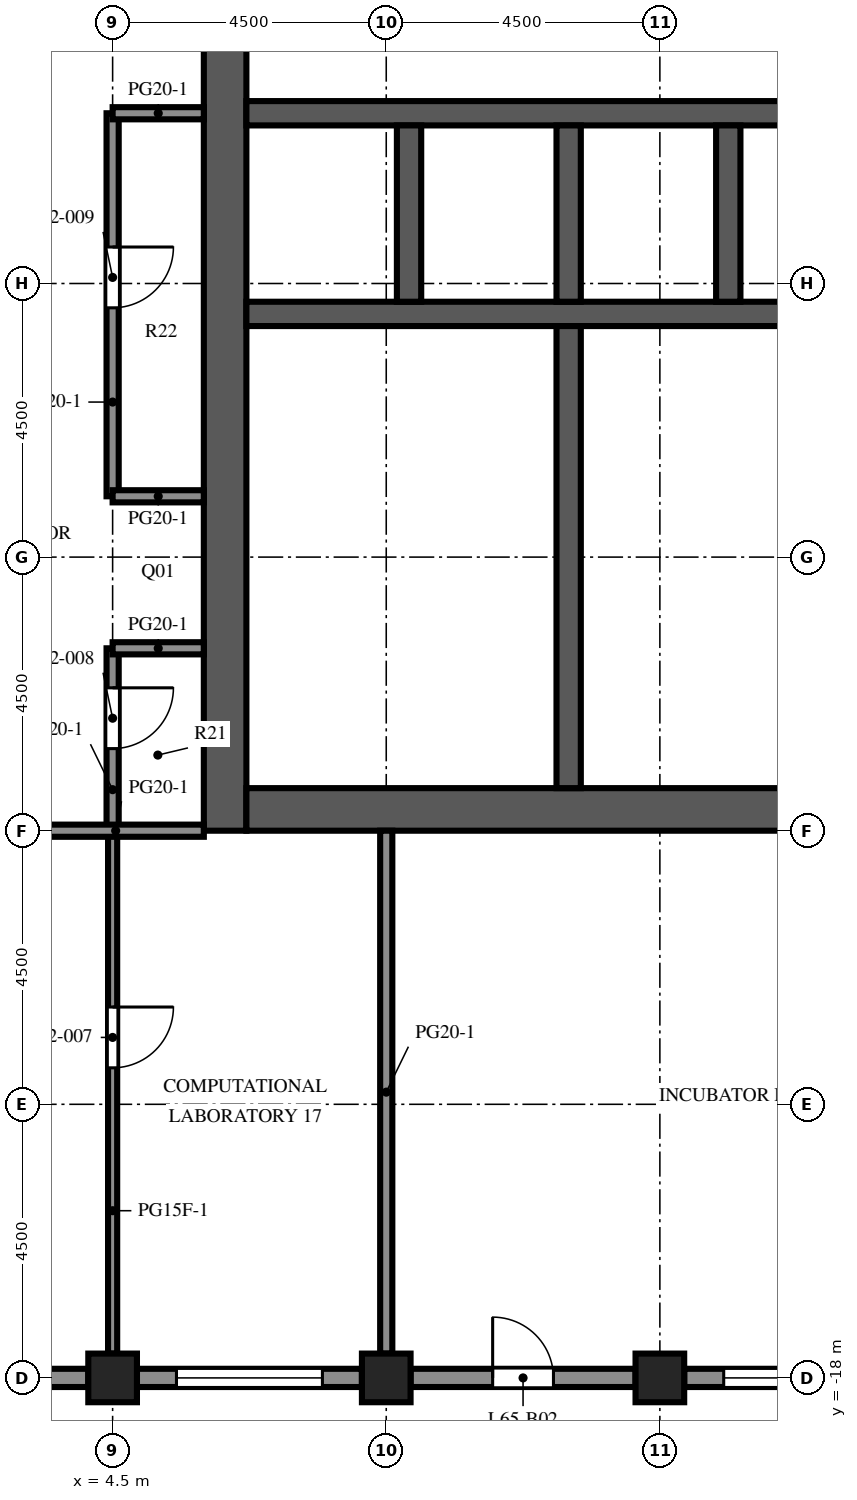
"""IFC4 building model, lengths in metres.
Left out: names, types, materials, properties, quantities, classifications, styles, units other than length and angle.
Written with IfcOpenShell. Run it as: python <this file> out.ifc"""

import sys

from ifc_helpers import new_model, si_unit, direction, frame, frame_2d, origin, origin_2d, place, context, subcontext, project, spatial, rectangle, extrude, element, fill, save


model = new_model("IFC4")
c1 = context("Model", 3, precision=1e-05, world=origin(), true_north=direction((0.0, 1.0)))
c2 = subcontext(c1, "Body", "Model", "MODEL_VIEW")
j1 = project(units=[si_unit("LENGTHUNIT", "METRE"), si_unit("PLANEANGLEUNIT", "RADIAN")], contexts=[c1])
p1 = place(None, origin())
s1 = spatial("IfcSite", under=j1, at=p1, CompositionType="ELEMENT")
p2 = place(p1, origin())
s2 = spatial("IfcBuilding", under=s1, at=p2, CompositionType="ELEMENT")
p3 = place(p2, frame((0.0, 0.0, 286.8)))
s3 = spatial("IfcBuildingStorey", under=s2, at=p3, CompositionType="ELEMENT", Elevation=286.8)
for number, where, z_axis, x_axis in (
    (1, (4.5, -18.0, 0.0), (0.0, 0.0, 1.0), (1.0, 0.0, 0.0)),
    (2, (9.0, -18.0, 0.0), (0.0, 0.0, 1.0), (1.0, 0.0, 0.0)),
    (3, (13.5, -18.0, 0.0), (0.0, 0.0, 1.0), (1.0, 0.0, 0.0)),
):
    element("IfcColumn", number, at=place(p3, frame(where, z_axis=z_axis, x_axis=x_axis)), inside=s3, PredefinedType="COLUMN", context=c2, shape_type="SweptSolid", body=[
        extrude(rectangle(XDim=0.8, YDim=0.8, at=origin_2d()), origin(), (0.0, 0.0, 1.0), 4.1),
    ])
p4 = place(p3, frame((6.35, -9.0, 0.0), z_axis=(0.0, 0.0, 1.0), x_axis=(0.0, 1.0, 0.0)))
e4 = element("IfcWall", 4, at=p4, inside=s3, PredefinedType="SHEAR", context=c2, shape_type="SweptSolid", body=[
    extrude(rectangle(XDim=27.5, YDim=0.7, at=frame_2d((13.75, 0.0))), origin(), (0.0, 0.0, 1.0), 4.1),
])
p5 = place(p4, frame((12.55, 0.0, 0.0)))
e5 = element("IfcOpeningElement", 5, at=p5, cuts=e4, PredefinedType="OPENING", context=c2, shape_type="SweptSolid", body=[
    extrude(rectangle(XDim=2.4, YDim=2.4, at=frame_2d((1.2, 1.2))), frame((0.0, 0.36, 0.0), z_axis=(0.0, -1.0, 0.0), x_axis=(1.0, 0.0, 0.0)), (0.0, 0.0, 1.0), 0.72),
])
p6 = place(p4, frame((3.9, 0.0, 0.0)))
e6 = element("IfcOpeningElement", 6, at=p6, cuts=e4, PredefinedType="OPENING", context=c2, shape_type="SweptSolid", body=[
    extrude(rectangle(XDim=1.2, YDim=2.1, at=frame_2d((0.6, 1.05))), frame((0.0, 0.36, 0.0), z_axis=(0.0, -1.0, 0.0), x_axis=(1.0, 0.0, 0.0)), (0.0, 0.0, 1.0), 0.72),
])
p7 = place(p4, frame((22.4, 0.0, 0.0)))
e7 = element("IfcOpeningElement", 7, at=p7, cuts=e4, PredefinedType="OPENING", context=c2, shape_type="SweptSolid", body=[
    extrude(rectangle(XDim=1.2, YDim=2.1, at=frame_2d((0.6, 1.05))), frame((0.0, 0.36, 0.0), z_axis=(0.0, -1.0, 0.0), x_axis=(1.0, 0.0, 0.0)), (0.0, 0.0, 1.0), 0.72),
])
p8 = place(p3, frame((6.7, -8.65, 0.0), z_axis=(0.0, 0.0, 1.0), x_axis=(1.0, 0.0, 0.0)))
e8 = element("IfcWall", 8, at=p8, inside=s3, PredefinedType="SHEAR", context=c2, shape_type="SweptSolid", body=[
    extrude(rectangle(XDim=10.6, YDim=0.7, at=frame_2d((5.3, 0.0))), origin(), (0.0, 0.0, 1.0), 4.1),
])
p9 = place(p3, frame((6.7, -0.5, 0.0), z_axis=(0.0, 0.0, 1.0), x_axis=(1.0, 0.0, 0.0)))
e9 = element("IfcWall", 9, at=p9, inside=s3, PredefinedType="SHEAR", context=c2, shape_type="SweptSolid", body=[
    extrude(rectangle(XDim=10.6, YDim=0.4, at=frame_2d((5.3, 0.0))), origin(), (0.0, 0.0, 1.0), 4.1),
])
p10 = place(p3, frame((6.7, 2.8, 0.0), z_axis=(0.0, 0.0, 1.0), x_axis=(1.0, 0.0, 0.0)))
e10 = element("IfcWall", 10, at=p10, inside=s3, PredefinedType="SHEAR", context=c2, shape_type="SweptSolid", body=[
    extrude(rectangle(XDim=10.6, YDim=0.4, at=frame_2d((5.3, 0.0))), origin(), (0.0, 0.0, 1.0), 4.1),
])
p11 = place(p10, frame((0.688, 0.0, 0.0)))
e11 = element("IfcOpeningElement", 11, at=p11, cuts=e10, PredefinedType="OPENING", context=c2, shape_type="SweptSolid", body=[
    extrude(rectangle(XDim=1.1, YDim=2.1, at=frame_2d((0.55, 1.05))), frame((0.0, 0.21, 0.0), z_axis=(0.0, -1.0, 0.0), x_axis=(1.0, 0.0, 0.0)), (0.0, 0.0, 1.0), 0.42),
])
p12 = place(p10, frame((3.438, 0.0, 0.0)))
e12 = element("IfcOpeningElement", 12, at=p12, cuts=e10, PredefinedType="OPENING", context=c2, shape_type="SweptSolid", body=[
    extrude(rectangle(XDim=1.1, YDim=2.1, at=frame_2d((0.55, 1.05))), frame((0.0, 0.21, 0.0), z_axis=(0.0, -1.0, 0.0), x_axis=(1.0, 0.0, 0.0)), (0.0, 0.0, 1.0), 0.42),
])
p13 = place(p10, frame((6.113, 0.0, 0.0)))
e13 = element("IfcOpeningElement", 13, at=p13, cuts=e10, PredefinedType="OPENING", context=c2, shape_type="SweptSolid", body=[
    extrude(rectangle(XDim=1.0, YDim=2.1, at=frame_2d((0.5, 1.05))), frame((0.0, 0.21, 0.0), z_axis=(0.0, -1.0, 0.0), x_axis=(1.0, 0.0, 0.0)), (0.0, 0.0, 1.0), 0.42),
])
p14 = place(p10, frame((8.863, 0.0, 0.0)))
e14 = element("IfcOpeningElement", 14, at=p14, cuts=e10, PredefinedType="OPENING", context=c2, shape_type="SweptSolid", body=[
    extrude(rectangle(XDim=1.0, YDim=2.1, at=frame_2d((0.5, 1.05))), frame((0.0, 0.21, 0.0), z_axis=(0.0, -1.0, 0.0), x_axis=(1.0, 0.0, 0.0)), (0.0, 0.0, 1.0), 0.42),
])
for number, where, z_axis, x_axis in (
    (15, (9.375, -0.3, 0.0), (0.0, 0.0, 1.0), (0.0, 1.0, 0.0)),
    (16, (12.0, -0.3, 0.0), (0.0, 0.0, 1.0), (0.0, 1.0, 0.0)),
    (17, (14.625, -0.3, 0.0), (0.0, 0.0, 1.0), (0.0, 1.0, 0.0)),
):
    element("IfcWall", number, at=place(p3, frame(where, z_axis=z_axis, x_axis=x_axis)), inside=s3, PredefinedType="SHEAR", context=c2, shape_type="SweptSolid", body=[
        extrude(rectangle(XDim=2.9, YDim=0.4, at=frame_2d((1.45, 0.0))), origin(), (0.0, 0.0, 1.0), 4.1),
    ])
p15 = place(p3, frame((12.0, -8.3, 0.0), z_axis=(0.0, 0.0, 1.0), x_axis=(0.0, 1.0, 0.0)))
e18 = element("IfcWall", 18, at=p15, inside=s3, PredefinedType="SHEAR", context=c2, shape_type="SweptSolid", body=[
    extrude(rectangle(XDim=7.6, YDim=0.4, at=frame_2d((3.8, 0.0))), origin(), (0.0, 0.0, 1.0), 4.1),
])
p16 = place(p3, frame((4.1, -18.0, 0.0), z_axis=(0.0, 0.0, 1.0), x_axis=(-1.0, 0.0, 0.0)))
e19 = element("IfcWall", 19, at=p16, inside=s3, PredefinedType="SOLIDWALL", context=c2, shape_type="SweptSolid", body=[
    extrude(rectangle(XDim=3.7, YDim=0.3, at=frame_2d((1.85, 0.0))), origin(), (0.0, 0.0, 1.0), 2.85),
])
p17 = place(p16, frame((0.65, 0.0, 0.8)))
e20 = element("IfcOpeningElement", 20, at=p17, cuts=e19, PredefinedType="OPENING", context=c2, shape_type="SweptSolid", body=[
    extrude(rectangle(XDim=2.4, YDim=1.7, at=frame_2d((1.2, 0.85))), frame((0.0, 0.16, 0.0), z_axis=(0.0, -1.0, 0.0), x_axis=(1.0, 0.0, 0.0)), (0.0, 0.0, 1.0), 0.32),
])
p18 = place(p3, frame((8.6, -18.0, 0.0), z_axis=(0.0, 0.0, 1.0), x_axis=(-1.0, 0.0, 0.0)))
e21 = element("IfcWall", 21, at=p18, inside=s3, PredefinedType="SOLIDWALL", context=c2, shape_type="SweptSolid", body=[
    extrude(rectangle(XDim=3.7, YDim=0.3, at=frame_2d((1.85, 0.0))), origin(), (0.0, 0.0, 1.0), 2.85),
])
p19 = place(p18, frame((0.65, 0.0, 0.8)))
e22 = element("IfcOpeningElement", 22, at=p19, cuts=e21, PredefinedType="OPENING", context=c2, shape_type="SweptSolid", body=[
    extrude(rectangle(XDim=2.4, YDim=1.7, at=frame_2d((1.2, 0.85))), frame((0.0, 0.16, 0.0), z_axis=(0.0, -1.0, 0.0), x_axis=(1.0, 0.0, 0.0)), (0.0, 0.0, 1.0), 0.32),
])
p20 = place(p3, frame((13.1, -18.0, 0.0), z_axis=(0.0, 0.0, 1.0), x_axis=(-1.0, 0.0, 0.0)))
e23 = element("IfcWall", 23, at=p20, inside=s3, PredefinedType="SOLIDWALL", context=c2, shape_type="SweptSolid", body=[
    extrude(rectangle(XDim=3.7, YDim=0.3, at=frame_2d((1.85, 0.0))), origin(), (0.0, 0.0, 1.0), 2.85),
])
p21 = place(p20, frame((1.35, 0.0, 0.0)))
e24 = element("IfcOpeningElement", 24, at=p21, cuts=e23, PredefinedType="OPENING", context=c2, shape_type="SweptSolid", body=[
    extrude(rectangle(XDim=1.0, YDim=2.2, at=frame_2d((0.5, 1.1))), frame((0.0, 0.16, 0.0), z_axis=(0.0, -1.0, 0.0), x_axis=(1.0, 0.0, 0.0)), (0.0, 0.0, 1.0), 0.32),
])
p22 = place(p3, frame((17.6, -18.0, 0.0), z_axis=(0.0, 0.0, 1.0), x_axis=(-1.0, 0.0, 0.0)))
e25 = element("IfcWall", 25, at=p22, inside=s3, PredefinedType="SOLIDWALL", context=c2, shape_type="SweptSolid", body=[
    extrude(rectangle(XDim=3.7, YDim=0.3, at=frame_2d((1.85, 0.0))), origin(), (0.0, 0.0, 1.0), 2.85),
])
p23 = place(p22, frame((0.65, 0.0, 0.8)))
e26 = element("IfcOpeningElement", 26, at=p23, cuts=e25, PredefinedType="OPENING", context=c2, shape_type="SweptSolid", body=[
    extrude(rectangle(XDim=2.4, YDim=1.7, at=frame_2d((1.2, 0.85))), frame((0.0, 0.16, 0.0), z_axis=(0.0, -1.0, 0.0), x_axis=(1.0, 0.0, 0.0)), (0.0, 0.0, 1.0), 0.32),
])
p24 = place(p3, frame((8.2, -8.3, 0.0), z_axis=(0.0, 0.0, 1.0), x_axis=(0.0, 1.0, 0.0)))
e27 = element("IfcWall", 27, at=p24, inside=s3, PredefinedType="PARTITIONING", context=c2, shape_type="SweptSolid", body=[
    extrude(rectangle(XDim=2.28, YDim=0.1, at=frame_2d((1.14, 0.0))), origin(), (0.0, 0.0, 1.0), 3.65),
])
p25 = place(p24, frame((0.64, 0.0, 0.0)))
e28 = element("IfcOpeningElement", 28, at=p25, cuts=e27, PredefinedType="OPENING", context=c2, shape_type="SweptSolid", body=[
    extrude(rectangle(XDim=1.0, YDim=2.1, at=frame_2d((0.5, 1.05))), frame((0.0, 0.06, 0.0), z_axis=(0.0, -1.0, 0.0), x_axis=(1.0, 0.0, 0.0)), (0.0, 0.0, 1.0), 0.12),
])
p26 = place(p3, frame((8.2, -6.02, 0.0), z_axis=(0.0, 0.0, 1.0), x_axis=(0.0, 1.0, 0.0)))
e29 = element("IfcWall", 29, at=p26, inside=s3, PredefinedType="PARTITIONING", context=c2, shape_type="SweptSolid", body=[
    extrude(rectangle(XDim=2.28, YDim=0.1, at=frame_2d((1.14, 0.0))), origin(), (0.0, 0.0, 1.0), 3.65),
])
p27 = place(p26, frame((0.64, 0.0, 0.0)))
e30 = element("IfcOpeningElement", 30, at=p27, cuts=e29, PredefinedType="OPENING", context=c2, shape_type="SweptSolid", body=[
    extrude(rectangle(XDim=1.0, YDim=2.1, at=frame_2d((0.5, 1.05))), frame((0.0, 0.06, 0.0), z_axis=(0.0, -1.0, 0.0), x_axis=(1.0, 0.0, 0.0)), (0.0, 0.0, 1.0), 0.12),
])
p28 = place(p3, frame((8.2, -3.74, 0.0), z_axis=(0.0, 0.0, 1.0), x_axis=(0.0, 1.0, 0.0)))
e31 = element("IfcWall", 31, at=p28, inside=s3, PredefinedType="PARTITIONING", context=c2, shape_type="SweptSolid", body=[
    extrude(rectangle(XDim=1.672, YDim=0.1, at=frame_2d((0.836, 0.0))), origin(), (0.0, 0.0, 1.0), 3.65),
])
p29 = place(p28, frame((0.336, 0.0, 0.0)))
e32 = element("IfcOpeningElement", 32, at=p29, cuts=e31, PredefinedType="OPENING", context=c2, shape_type="SweptSolid", body=[
    extrude(rectangle(XDim=1.0, YDim=2.1, at=frame_2d((0.5, 1.05))), frame((0.0, 0.06, 0.0), z_axis=(0.0, -1.0, 0.0), x_axis=(1.0, 0.0, 0.0)), (0.0, 0.0, 1.0), 0.12),
])
p30 = place(p3, frame((8.2, -2.068, 0.0), z_axis=(0.0, 0.0, 1.0), x_axis=(0.0, 1.0, 0.0)))
e33 = element("IfcWall", 33, at=p30, inside=s3, PredefinedType="PARTITIONING", context=c2, shape_type="SweptSolid", body=[
    extrude(rectangle(XDim=1.368, YDim=0.1, at=frame_2d((0.684, 0.0))), origin(), (0.0, 0.0, 1.0), 3.65),
])
p31 = place(p30, frame((0.2, 0.0, 0.0)))
e34 = element("IfcOpeningElement", 34, at=p31, cuts=e33, PredefinedType="OPENING", context=c2, shape_type="SweptSolid", body=[
    extrude(rectangle(XDim=0.968, YDim=2.1, at=frame_2d((0.484, 1.05))), frame((0.0, 0.06, 0.0), z_axis=(0.0, -1.0, 0.0), x_axis=(1.0, 0.0, 0.0)), (0.0, 0.0, 1.0), 0.12),
])
for number, where, z_axis, x_axis in (
    (35, (8.2, -6.02, 0.0), (0.0, 0.0, 1.0), (1.0, 0.0, 0.0)),
    (36, (8.2, -3.74, 0.0), (0.0, 0.0, 1.0), (1.0, 0.0, 0.0)),
    (37, (8.2, -2.068, 0.0), (0.0, 0.0, 1.0), (1.0, 0.0, 0.0)),
):
    element("IfcWall", number, at=place(p3, frame(where, z_axis=z_axis, x_axis=x_axis)), inside=s3, PredefinedType="PARTITIONING", context=c2, shape_type="SweptSolid", body=[
        extrude(rectangle(XDim=3.6, YDim=0.1, at=frame_2d((1.8, 0.0))), origin(), (0.0, 0.0, 1.0), 3.65),
    ])
p32 = place(p3, frame((4.5, -9.0, 0.0), z_axis=(0.0, 0.0, 1.0), x_axis=(0.0, -1.0, 0.0)))
e38 = element("IfcWall", 38, at=p32, inside=s3, PredefinedType="PARTITIONING", context=c2, shape_type="SweptSolid", body=[
    extrude(rectangle(XDim=8.6, YDim=0.15, at=frame_2d((4.3, 0.0))), origin(), (0.0, 0.0, 1.0), 3.65),
])
p33 = place(p32, frame((2.9, 0.0, 0.0)))
e39 = element("IfcOpeningElement", 39, at=p33, cuts=e38, PredefinedType="OPENING", context=c2, shape_type="SweptSolid", body=[
    extrude(rectangle(XDim=1.0, YDim=2.1, at=frame_2d((0.5, 1.05))), frame((0.0, 0.085, 0.0), z_axis=(0.0, -1.0, 0.0), x_axis=(1.0, 0.0, 0.0)), (0.0, 0.0, 1.0), 0.17),
])
p34 = place(p3, frame((4.5, -6.0, 0.0), z_axis=(0.0, 0.0, 1.0), x_axis=(0.0, -1.0, 0.0)))
e40 = element("IfcWall", 40, at=p34, inside=s3, PredefinedType="PARTITIONING", context=c2, shape_type="SweptSolid", body=[
    extrude(rectangle(XDim=3.0, YDim=0.2, at=frame_2d((1.5, 0.0))), origin(), (0.0, 0.0, 1.0), 3.65),
])
p35 = place(p34, frame((0.65, 0.0, 0.0)))
e41 = element("IfcOpeningElement", 41, at=p35, cuts=e40, PredefinedType="OPENING", context=c2, shape_type="SweptSolid", body=[
    extrude(rectangle(XDim=1.0, YDim=2.1, at=frame_2d((0.5, 1.05))), frame((0.0, 0.11, 0.0), z_axis=(0.0, -1.0, 0.0), x_axis=(1.0, 0.0, 0.0)), (0.0, 0.0, 1.0), 0.22),
])
p36 = place(p3, frame((4.5, 2.8, 0.0), z_axis=(0.0, 0.0, 1.0), x_axis=(0.0, -1.0, 0.0)))
e42 = element("IfcWall", 42, at=p36, inside=s3, PredefinedType="PARTITIONING", context=c2, shape_type="SweptSolid", body=[
    extrude(rectangle(XDim=6.3, YDim=0.2, at=frame_2d((3.15, 0.0))), origin(), (0.0, 0.0, 1.0), 3.65),
])
p37 = place(p36, frame((2.2, 0.0, 0.0)))
e43 = element("IfcOpeningElement", 43, at=p37, cuts=e42, PredefinedType="OPENING", context=c2, shape_type="SweptSolid", body=[
    extrude(rectangle(XDim=1.0, YDim=2.1, at=frame_2d((0.5, 1.05))), frame((0.0, 0.11, 0.0), z_axis=(0.0, -1.0, 0.0), x_axis=(1.0, 0.0, 0.0)), (0.0, 0.0, 1.0), 0.22),
])
p38 = place(p3, frame((9.0, -17.6, 0.0), z_axis=(0.0, 0.0, 1.0), x_axis=(0.0, 1.0, 0.0)))
e44 = element("IfcWall", 44, at=p38, inside=s3, PredefinedType="PARTITIONING", context=c2, shape_type="SweptSolid", body=[
    extrude(rectangle(XDim=8.6, YDim=0.2, at=frame_2d((4.3, 0.0))), origin(), (0.0, 0.0, 1.0), 3.65),
])
p39 = place(p3, frame((6.0, -9.0, 0.0), z_axis=(0.0, 0.0, 1.0), x_axis=(-1.0, 0.0, 0.0)))
e45 = element("IfcWall", 45, at=p39, inside=s3, PredefinedType="PARTITIONING", context=c2, shape_type="SweptSolid", body=[
    extrude(rectangle(XDim=4.5, YDim=0.2, at=frame_2d((2.25, 0.0))), origin(), (0.0, 0.0, 1.0), 3.65),
])
p40 = place(p39, frame((2.9, 0.0, 0.0)))
e46 = element("IfcOpeningElement", 46, at=p40, cuts=e45, PredefinedType="OPENING", context=c2, shape_type="SweptSolid", body=[
    extrude(rectangle(XDim=1.0, YDim=2.1, at=frame_2d((0.5, 1.05))), frame((0.0, 0.11, 0.0), z_axis=(0.0, -1.0, 0.0), x_axis=(1.0, 0.0, 0.0)), (0.0, 0.0, 1.0), 0.22),
])
for number, where, z_axis, x_axis in (
    (47, (4.5, -6.0, 0.0), (0.0, 0.0, 1.0), (1.0, 0.0, 0.0)),
    (48, (4.5, -3.5, 0.0), (0.0, 0.0, 1.0), (1.0, 0.0, 0.0)),
    (49, (4.5, 2.8, 0.0), (0.0, 0.0, 1.0), (1.0, 0.0, 0.0)),
):
    element("IfcWall", number, at=place(p3, frame(where, z_axis=z_axis, x_axis=x_axis)), inside=s3, PredefinedType="PARTITIONING", context=c2, shape_type="SweptSolid", body=[
        extrude(rectangle(XDim=1.5, YDim=0.2, at=frame_2d((0.75, 0.0))), origin(), (0.0, 0.0, 1.0), 3.65),
    ])
p41 = place(p19, origin())
e50 = element("IfcWindow", 50, at=p41, inside=s3, PartitioningType="SINGLE_PANEL", PredefinedType="WINDOW", context=c2, shape_type="SweptSolid", body=[
    extrude(rectangle(XDim=2.4, YDim=1.7, at=frame_2d((1.2, 0.85))), frame((0.0, 0.03, 0.0), z_axis=(0.0, -1.0, 0.0), x_axis=(1.0, 0.0, 0.0)), (0.0, 0.0, 1.0), 0.06),
])
fill(e22, e50)
p42 = place(p21, origin())
e51 = element("IfcDoor", 51, at=p42, inside=s3, OperationType="SINGLE_SWING_RIGHT", PredefinedType="DOOR", context=c2, shape_type="SweptSolid", body=[
    extrude(rectangle(XDim=1.0, YDim=2.2, at=frame_2d((0.5, 1.1))), frame((0.0, 0.025, 0.0), z_axis=(0.0, -1.0, 0.0), x_axis=(1.0, 0.0, 0.0)), (0.0, 0.0, 1.0), 0.05),
])
fill(e24, e51)
p43 = place(p23, origin())
e52 = element("IfcWindow", 52, at=p43, inside=s3, PartitioningType="SINGLE_PANEL", PredefinedType="WINDOW", context=c2, shape_type="SweptSolid", body=[
    extrude(rectangle(XDim=2.4, YDim=1.7, at=frame_2d((1.2, 0.85))), frame((0.0, 0.03, 0.0), z_axis=(0.0, -1.0, 0.0), x_axis=(1.0, 0.0, 0.0)), (0.0, 0.0, 1.0), 0.06),
])
fill(e26, e52)
p44 = place(p11, origin())
e53 = element("IfcDoor", 53, at=p44, inside=s3, OperationType="DOUBLE_DOOR_SLIDING", PredefinedType="DOOR", context=c2, shape_type="SweptSolid", body=[
    extrude(rectangle(XDim=1.1, YDim=2.1, at=frame_2d((0.55, 1.05))), frame((0.0, 0.025, 0.0), z_axis=(0.0, -1.0, 0.0), x_axis=(1.0, 0.0, 0.0)), (0.0, 0.0, 1.0), 0.05),
])
fill(e11, e53)
p45 = place(p12, origin())
e54 = element("IfcDoor", 54, at=p45, inside=s3, OperationType="DOUBLE_DOOR_SLIDING", PredefinedType="DOOR", context=c2, shape_type="SweptSolid", body=[
    extrude(rectangle(XDim=1.1, YDim=2.1, at=frame_2d((0.55, 1.05))), frame((0.0, 0.025, 0.0), z_axis=(0.0, -1.0, 0.0), x_axis=(1.0, 0.0, 0.0)), (0.0, 0.0, 1.0), 0.05),
])
fill(e12, e54)
p46 = place(p5, origin())
e55 = element("IfcDoor", 55, at=p46, inside=s3, OperationType="DOUBLE_DOOR_DOUBLE_SWING", PredefinedType="DOOR", context=c2, shape_type="SweptSolid", body=[
    extrude(rectangle(XDim=2.4, YDim=2.4, at=frame_2d((1.2, 1.2))), frame((0.0, 0.025, 0.0), z_axis=(0.0, -1.0, 0.0), x_axis=(1.0, 0.0, 0.0)), (0.0, 0.0, 1.0), 0.05),
])
fill(e5, e55)
p47 = place(p13, origin())
e56 = element("IfcDoor", 56, at=p47, inside=s3, OperationType="SINGLE_SWING_LEFT", PredefinedType="DOOR", context=c2, shape_type="SweptSolid", body=[
    extrude(rectangle(XDim=1.0, YDim=2.1, at=frame_2d((0.5, 1.05))), frame((0.0, 0.025, 0.0), z_axis=(0.0, -1.0, 0.0), x_axis=(1.0, 0.0, 0.0)), (0.0, 0.0, 1.0), 0.05),
])
fill(e13, e56)
p48 = place(p6, origin())
e57 = element("IfcDoor", 57, at=p48, inside=s3, OperationType="SINGLE_SWING_RIGHT", PredefinedType="DOOR", context=c2, shape_type="SweptSolid", body=[
    extrude(rectangle(XDim=1.2, YDim=2.1, at=frame_2d((0.6, 1.05))), frame((0.0, -0.275, 0.0), z_axis=(0.0, -1.0, 0.0), x_axis=(1.0, 0.0, 0.0)), (0.0, 0.0, 1.0), 0.05),
])
fill(e6, e57)
p49 = place(p25, origin())
e58 = element("IfcDoor", 58, at=p49, inside=s3, OperationType="SINGLE_SWING_LEFT", PredefinedType="DOOR", context=c2, shape_type="SweptSolid", body=[
    extrude(rectangle(XDim=1.0, YDim=2.1, at=frame_2d((0.5, 1.05))), frame((0.0, 0.025, 0.0), z_axis=(0.0, -1.0, 0.0), x_axis=(1.0, 0.0, 0.0)), (0.0, 0.0, 1.0), 0.05),
])
fill(e28, e58)
p50 = place(p27, origin())
e59 = element("IfcDoor", 59, at=p50, inside=s3, OperationType="SINGLE_SWING_RIGHT", PredefinedType="DOOR", context=c2, shape_type="SweptSolid", body=[
    extrude(rectangle(XDim=1.0, YDim=2.1, at=frame_2d((0.5, 1.05))), frame((0.0, 0.025, 0.0), z_axis=(0.0, -1.0, 0.0), x_axis=(1.0, 0.0, 0.0)), (0.0, 0.0, 1.0), 0.05),
])
fill(e30, e59)
p51 = place(p29, origin())
e60 = element("IfcDoor", 60, at=p51, inside=s3, OperationType="SINGLE_SWING_LEFT", PredefinedType="DOOR", context=c2, shape_type="SweptSolid", body=[
    extrude(rectangle(XDim=1.0, YDim=2.1, at=frame_2d((0.5, 1.05))), frame((0.0, 0.025, 0.0), z_axis=(0.0, -1.0, 0.0), x_axis=(1.0, 0.0, 0.0)), (0.0, 0.0, 1.0), 0.05),
])
fill(e32, e60)
p52 = place(p31, origin())
e61 = element("IfcDoor", 61, at=p52, inside=s3, OperationType="SINGLE_SWING_RIGHT", PredefinedType="DOOR", context=c2, shape_type="SweptSolid", body=[
    extrude(rectangle(XDim=0.968, YDim=2.1, at=frame_2d((0.484, 1.05))), frame((0.0, 0.025, 0.0), z_axis=(0.0, -1.0, 0.0), x_axis=(1.0, 0.0, 0.0)), (0.0, 0.0, 1.0), 0.05),
])
fill(e34, e61)
p53 = place(p33, origin())
e62 = element("IfcDoor", 62, at=p53, inside=s3, OperationType="SINGLE_SWING_LEFT", PredefinedType="DOOR", context=c2, shape_type="SweptSolid", body=[
    extrude(rectangle(XDim=1.0, YDim=2.1, at=frame_2d((0.5, 1.05))), frame((0.0, 0.025, 0.0), z_axis=(0.0, -1.0, 0.0), x_axis=(1.0, 0.0, 0.0)), (0.0, 0.0, 1.0), 0.05),
])
fill(e39, e62)
p54 = place(p35, origin())
e63 = element("IfcDoor", 63, at=p54, inside=s3, OperationType="SINGLE_SWING_LEFT", PredefinedType="DOOR", context=c2, shape_type="SweptSolid", body=[
    extrude(rectangle(XDim=1.0, YDim=2.1, at=frame_2d((0.5, 1.05))), frame((0.0, 0.025, 0.0), z_axis=(0.0, -1.0, 0.0), x_axis=(1.0, 0.0, 0.0)), (0.0, 0.0, 1.0), 0.05),
])
fill(e41, e63)
p55 = place(p37, origin())
e64 = element("IfcDoor", 64, at=p55, inside=s3, OperationType="SINGLE_SWING_LEFT", PredefinedType="DOOR", context=c2, shape_type="SweptSolid", body=[
    extrude(rectangle(XDim=1.0, YDim=2.1, at=frame_2d((0.5, 1.05))), frame((0.0, 0.025, 0.0), z_axis=(0.0, -1.0, 0.0), x_axis=(1.0, 0.0, 0.0)), (0.0, 0.0, 1.0), 0.05),
])
fill(e43, e64)
save(model, sys.argv[1])
